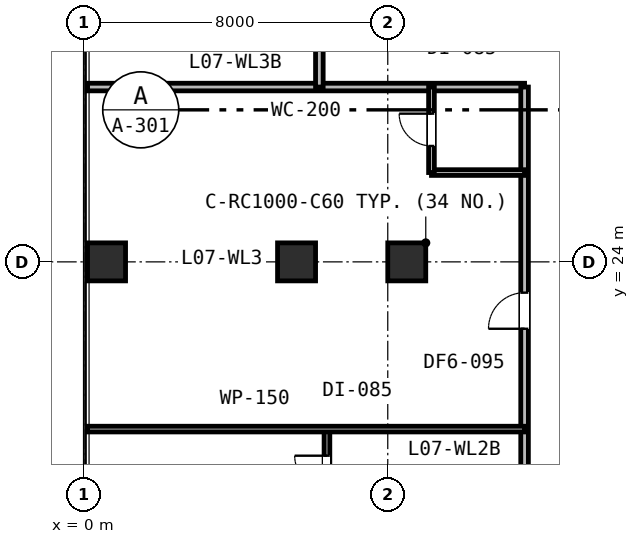
"""IFC4 building model, lengths in metres.
Left out: names, types, materials, properties, quantities, classifications, styles, units other than length and angle.
Written with IfcOpenShell. Run it as: python <this file> out.ifc"""

import sys

from ifc_helpers import new_model, si_unit, direction, frame, frame_2d, origin, origin_2d, place, context, subcontext, project, spatial, rectangle, extrude, element, fill, save


model = new_model("IFC4")
c1 = context("Model", 3, precision=1e-05, world=origin(), true_north=direction((0.0, 1.0)))
c2 = subcontext(c1, "Body", "Model", "MODEL_VIEW")
j1 = project(units=[si_unit("LENGTHUNIT", "METRE"), si_unit("PLANEANGLEUNIT", "RADIAN")], contexts=[c1])
p1 = place(None, origin())
s1 = spatial("IfcSite", under=j1, at=p1, CompositionType="ELEMENT")
p2 = place(p1, origin())
s2 = spatial("IfcBuilding", under=s1, at=p2, CompositionType="ELEMENT")
p3 = place(p2, frame((0.0, 0.0, 33.0)))
s3 = spatial("IfcBuildingStorey", under=s2, at=p3, CompositionType="ELEMENT", Elevation=33.0)
for number, where, z_axis, x_axis in (
    (1, (8.5, 24.0, 0.0), (0.0, 0.0, 1.0), (1.0, 0.0, 0.0)),
    (2, (5.6, 24.0, 0.0), (0.0, 0.0, 1.0), (1.0, 0.0, 0.0)),
    (3, (0.6, 24.0, 0.0), (0.0, 0.0, 1.0), (1.0, 0.0, 0.0)),
):
    element("IfcColumn", number, at=place(p3, frame(where, z_axis=z_axis, x_axis=x_axis)), inside=s3, PredefinedType="COLUMN", context=c2, shape_type="SweptSolid", body=[
        extrude(rectangle(XDim=1.0, YDim=1.0, at=origin_2d()), origin(), (0.0, 0.0, 1.0), 3.6),
    ])
p4 = place(p3, frame((0.1, 28.6, 0.0), z_axis=(0.0, 0.0, 1.0), x_axis=(1.0, 0.0, 0.0)))
e4 = element("IfcWall", 4, at=p4, inside=s3, PredefinedType="PARTITIONING", context=c2, shape_type="SweptSolid", body=[
    extrude(rectangle(XDim=11.5, YDim=0.2, at=frame_2d((5.75, 0.0))), origin(), (0.0, 0.0, 1.0), 2.68),
])
p5 = place(p3, frame((6.2, 28.6, 0.0), z_axis=(0.0, 0.0, 1.0), x_axis=(0.0, 1.0, 0.0)))
e5 = element("IfcWall", 5, at=p5, inside=s3, PredefinedType="PARTITIONING", context=c2, shape_type="SweptSolid", body=[
    extrude(rectangle(XDim=12.4, YDim=0.2, at=frame_2d((6.2, 0.0))), origin(), (0.0, 0.0, 1.0), 2.68),
])
p6 = place(p5, frame((3.725, 0.0, 0.0)))
e6 = element("IfcOpeningElement", 6, at=p6, cuts=e5, PredefinedType="OPENING", context=c2, shape_type="SweptSolid", body=[
    extrude(rectangle(XDim=0.95, YDim=2.15, at=frame_2d((0.475, 1.075))), frame((0.0, 0.11, 0.0), z_axis=(0.0, -1.0, 0.0), x_axis=(1.0, 0.0, 0.0)), (0.0, 0.0, 1.0), 0.22),
])
p7 = place(p5, frame((8.91, 0.0, 0.0)))
e7 = element("IfcOpeningElement", 7, at=p7, cuts=e5, PredefinedType="OPENING", context=c2, shape_type="SweptSolid", body=[
    extrude(rectangle(XDim=0.95, YDim=2.15, at=frame_2d((0.475, 1.075))), frame((0.0, 0.11, 0.0), z_axis=(0.0, -1.0, 0.0), x_axis=(1.0, 0.0, 0.0)), (0.0, 0.0, 1.0), 0.22),
])
p8 = place(p3, frame((11.6, 5.6, 0.0), z_axis=(0.0, 0.0, 1.0), x_axis=(0.0, 1.0, 0.0)))
e8 = element("IfcWall", 8, at=p8, inside=s3, PredefinedType="PARTITIONING", context=c2, shape_type="SweptSolid", body=[
    extrude(rectangle(XDim=23.0, YDim=0.2, at=frame_2d((11.5, 0.0))), origin(), (0.0, 0.0, 1.0), 2.68),
])
p9 = place(p8, frame((2.19, 0.0, 0.0)))
e9 = element("IfcOpeningElement", 9, at=p9, cuts=e8, PredefinedType="OPENING", context=c2, shape_type="SweptSolid", body=[
    extrude(rectangle(XDim=0.95, YDim=2.15, at=frame_2d((0.475, 1.075))), frame((0.0, 0.11, 0.0), z_axis=(0.0, -1.0, 0.0), x_axis=(1.0, 0.0, 0.0)), (0.0, 0.0, 1.0), 0.22),
])
p10 = place(p8, frame((9.29, 0.0, 0.0)))
e10 = element("IfcOpeningElement", 10, at=p10, cuts=e8, PredefinedType="OPENING", context=c2, shape_type="SweptSolid", body=[
    extrude(rectangle(XDim=0.95, YDim=2.15, at=frame_2d((0.475, 1.075))), frame((0.0, 0.11, 0.0), z_axis=(0.0, -1.0, 0.0), x_axis=(1.0, 0.0, 0.0)), (0.0, 0.0, 1.0), 0.22),
])
p11 = place(p8, frame((16.64, 0.0, 0.0)))
e11 = element("IfcOpeningElement", 11, at=p11, cuts=e8, PredefinedType="OPENING", context=c2, shape_type="SweptSolid", body=[
    extrude(rectangle(XDim=0.95, YDim=2.15, at=frame_2d((0.475, 1.075))), frame((0.0, 0.11, 0.0), z_axis=(0.0, -1.0, 0.0), x_axis=(1.0, 0.0, 0.0)), (0.0, 0.0, 1.0), 0.22),
])
p12 = place(p3, frame((6.4, 17.35, 0.0), z_axis=(0.0, 0.0, 1.0), x_axis=(0.0, 1.0, 0.0)))
e12 = element("IfcWall", 12, at=p12, inside=s3, PredefinedType="PARTITIONING", context=c2, shape_type="SweptSolid", body=[
    extrude(rectangle(XDim=2.25, YDim=0.15, at=frame_2d((1.125, 0.0))), origin(), (0.0, 0.0, 1.0), 2.68),
])
p13 = place(p12, frame((0.7, 0.0, 0.0)))
e13 = element("IfcOpeningElement", 13, at=p13, cuts=e12, PredefinedType="OPENING", context=c2, shape_type="SweptSolid", body=[
    extrude(rectangle(XDim=0.85, YDim=2.15, at=frame_2d((0.425, 1.075))), frame((0.0, 0.085, 0.0), z_axis=(0.0, -1.0, 0.0), x_axis=(1.0, 0.0, 0.0)), (0.0, 0.0, 1.0), 0.17),
])
p14 = place(p3, frame((0.1, 19.6, 0.0), z_axis=(0.0, 0.0, 1.0), x_axis=(1.0, 0.0, 0.0)))
e14 = element("IfcWall", 14, at=p14, inside=s3, PredefinedType="PARTITIONING", context=c2, shape_type="SweptSolid", body=[
    extrude(rectangle(XDim=11.5, YDim=0.15, at=frame_2d((5.75, 0.0))), origin(), (0.0, 0.0, 1.0), 2.68),
])
p15 = place(p3, frame((9.15, 26.35, 0.0), z_axis=(0.0, 0.0, 1.0), x_axis=(1.0, 0.0, 0.0)))
e15 = element("IfcWall", 15, at=p15, inside=s3, PredefinedType="PARTITIONING", context=c2, shape_type="SweptSolid", body=[
    extrude(rectangle(XDim=2.45, YDim=0.15, at=frame_2d((1.225, 0.0))), origin(), (0.0, 0.0, 1.0), 3.33),
])
p16 = place(p3, frame((9.15, 26.35, 0.0), z_axis=(0.0, 0.0, 1.0), x_axis=(0.0, 1.0, 0.0)))
e16 = element("IfcWall", 16, at=p16, inside=s3, PredefinedType="PARTITIONING", context=c2, shape_type="SweptSolid", body=[
    extrude(rectangle(XDim=2.25, YDim=0.15, at=frame_2d((1.125, 0.0))), origin(), (0.0, 0.0, 1.0), 3.33),
])
p17 = place(p16, frame((0.7, 0.0, 0.0)))
e17 = element("IfcOpeningElement", 17, at=p17, cuts=e16, PredefinedType="OPENING", context=c2, shape_type="SweptSolid", body=[
    extrude(rectangle(XDim=0.85, YDim=2.15, at=frame_2d((0.425, 1.075))), frame((0.0, 0.085, 0.0), z_axis=(0.0, -1.0, 0.0), x_axis=(1.0, 0.0, 0.0)), (0.0, 0.0, 1.0), 0.17),
])
p18 = place(p13, origin())
e18 = element("IfcDoor", 18, at=p18, inside=s3, OperationType="SINGLE_SWING_RIGHT", PredefinedType="DOOR", context=c2, shape_type="SweptSolid", body=[
    extrude(rectangle(XDim=0.85, YDim=2.15, at=frame_2d((0.425, 1.075))), frame((0.0, 0.025, 0.0), z_axis=(0.0, -1.0, 0.0), x_axis=(1.0, 0.0, 0.0)), (0.0, 0.0, 1.0), 0.05),
])
fill(e13, e18)
p19 = place(p11, origin())
e19 = element("IfcDoor", 19, at=p19, inside=s3, OperationType="SINGLE_SWING_LEFT", PredefinedType="DOOR", context=c2, shape_type="SweptSolid", body=[
    extrude(rectangle(XDim=0.95, YDim=2.15, at=frame_2d((0.475, 1.075))), frame((0.0, 0.025, 0.0), z_axis=(0.0, -1.0, 0.0), x_axis=(1.0, 0.0, 0.0)), (0.0, 0.0, 1.0), 0.05),
])
fill(e11, e19)
p20 = place(p17, origin())
e20 = element("IfcDoor", 20, at=p20, inside=s3, OperationType="SINGLE_SWING_RIGHT", PredefinedType="DOOR", context=c2, shape_type="SweptSolid", body=[
    extrude(rectangle(XDim=0.85, YDim=2.15, at=frame_2d((0.425, 1.075))), frame((0.0, 0.025, 0.0), z_axis=(0.0, -1.0, 0.0), x_axis=(1.0, 0.0, 0.0)), (0.0, 0.0, 1.0), 0.05),
])
fill(e17, e20)
save(model, sys.argv[1])
